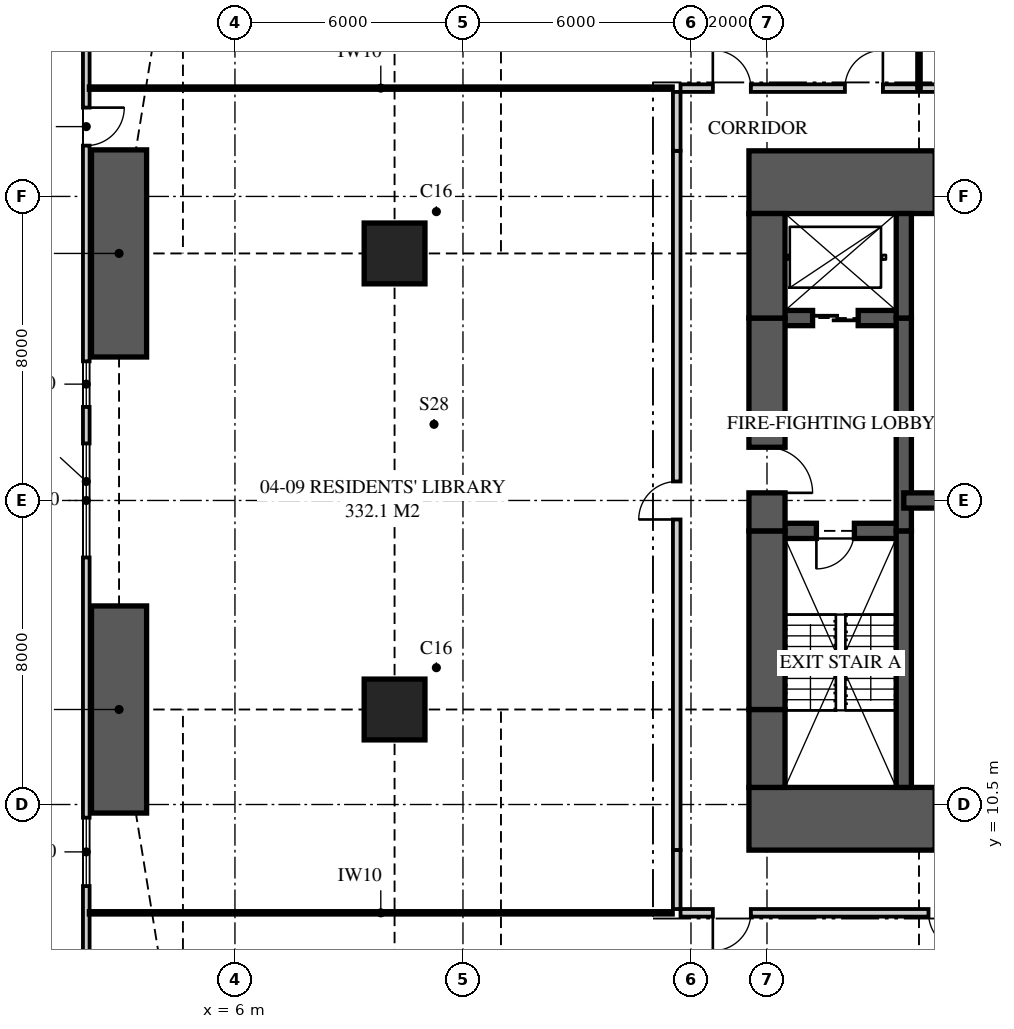
"""IFC4 building model, lengths in metres.
Left out: names, types, materials, properties, quantities, classifications, styles, units other than length and angle.
Written with IfcOpenShell. Run it as: python <this file> out.ifc"""

import sys

from ifc_helpers import new_model, si_unit, direction, frame, frame_2d, origin, origin_2d, place, context, subcontext, project, spatial, polyline, rectangle, outline, extrude, element, fill, save


model = new_model("IFC4")
c1 = context("Model", 3, precision=1e-05, world=origin(), true_north=direction((0.0, 1.0)))
c2 = subcontext(c1, "Body", "Model", "MODEL_VIEW")
j1 = project(units=[si_unit("LENGTHUNIT", "METRE"), si_unit("PLANEANGLEUNIT", "RADIAN")], contexts=[c1])
p1 = place(None, origin())
s1 = spatial("IfcSite", under=j1, at=p1, CompositionType="ELEMENT")
p2 = place(p1, origin())
s2 = spatial("IfcBuilding", under=s1, at=p2, CompositionType="ELEMENT")
p3 = place(p2, frame((0.0, 0.0, 21.0)))
s3 = spatial("IfcBuildingStorey", under=s2, at=p3, CompositionType="ELEMENT", Elevation=21.0)
for number, where, z_axis, x_axis in (
    (1, (10.2, 13.0, 0.0), (0.0, 0.0, 1.0), (1.0, 0.0, 0.0)),
    (2, (10.2, 25.0, 0.0), (0.0, 0.0, 1.0), (1.0, 0.0, 0.0)),
):
    element("IfcColumn", number, at=place(p3, frame(where, z_axis=z_axis, x_axis=x_axis)), inside=s3, PredefinedType="COLUMN", context=c2, shape_type="SweptSolid", body=[
        extrude(rectangle(XDim=1.6, YDim=1.6, at=origin_2d()), origin(), (0.0, 0.0, 1.0), 3.35),
    ])
p4 = place(p3, frame((19.525, 10.125, 0.0), z_axis=(0.0, 0.0, 1.0), x_axis=(1.0, 0.0, 0.0)))
e3 = element("IfcWall", 3, at=p4, inside=s3, PredefinedType="SHEAR", context=c2, shape_type="SweptSolid", body=[
    extrude(rectangle(XDim=6.475, YDim=1.65, at=frame_2d((3.238, 0.0))), origin(), (0.0, 0.0, 1.0), 3.35),
])
p5 = place(p4, frame((4.9, 0.0, 0.0)))
e4 = element("IfcOpeningElement", 4, at=p5, cuts=e3, PredefinedType="OPENING", context=c2, shape_type="SweptSolid", body=[
    extrude(rectangle(XDim=0.75, YDim=2.1, at=frame_2d((0.375, 1.05))), frame((0.0, 0.835, 0.0), z_axis=(0.0, -1.0, 0.0), x_axis=(1.0, 0.0, 0.0)), (0.0, 0.0, 1.0), 1.67),
])
p6 = place(p3, frame((26.0, 26.875, 0.0), z_axis=(0.0, 0.0, 1.0), x_axis=(-1.0, 0.0, 0.0)))
e5 = element("IfcWall", 5, at=p6, inside=s3, PredefinedType="SHEAR", context=c2, shape_type="SweptSolid", body=[
    extrude(rectangle(XDim=6.475, YDim=1.65, at=frame_2d((3.238, 0.0))), origin(), (0.0, 0.0, 1.0), 3.35),
])
p7 = place(p6, frame((0.825, 0.0, 0.0)))
e6 = element("IfcOpeningElement", 6, at=p7, cuts=e5, PredefinedType="OPENING", context=c2, shape_type="SweptSolid", body=[
    extrude(rectangle(XDim=0.75, YDim=2.1, at=frame_2d((0.375, 1.05))), frame((0.0, 0.835, 0.0), z_axis=(0.0, -1.0, 0.0), x_axis=(1.0, 0.0, 0.0)), (0.0, 0.0, 1.0), 1.67),
])
p8 = place(p3, frame((20.0, 26.05, 0.0), z_axis=(0.0, 0.0, 1.0), x_axis=(0.0, -1.0, 0.0)))
e7 = element("IfcWall", 7, at=p8, inside=s3, PredefinedType="SHEAR", context=c2, shape_type="SweptSolid", body=[
    extrude(rectangle(XDim=2.75, YDim=0.95, at=frame_2d((1.375, 0.0))), origin(), (0.0, 0.0, 1.0), 3.35),
])
p9 = place(p3, frame((20.0, 23.3, 0.0), z_axis=(0.0, 0.0, 1.0), x_axis=(0.0, -1.0, 0.0)))
e8 = element("IfcWall", 8, at=p9, inside=s3, PredefinedType="SHEAR", context=c2, shape_type="SweptSolid", body=[
    extrude(rectangle(XDim=5.6, YDim=0.95, at=frame_2d((2.8, 0.0))), origin(), (0.0, 0.0, 1.0), 3.35),
])
p10 = place(p9, frame((3.4, 0.0, 0.0)))
e9 = element("IfcOpeningElement", 9, at=p10, cuts=e8, PredefinedType="OPENING", context=c2, shape_type="SweptSolid", body=[
    extrude(rectangle(XDim=1.2, YDim=2.2, at=frame_2d((0.6, 1.1))), frame((0.0, 0.485, 0.0), z_axis=(0.0, -1.0, 0.0), x_axis=(1.0, 0.0, 0.0)), (0.0, 0.0, 1.0), 0.97),
])
p11 = place(p3, frame((20.0, 17.7, 0.0), z_axis=(0.0, 0.0, 1.0), x_axis=(0.0, -1.0, 0.0)))
e10 = element("IfcWall", 10, at=p11, inside=s3, PredefinedType="SHEAR", context=c2, shape_type="SweptSolid", body=[
    extrude(rectangle(XDim=4.7, YDim=0.95, at=frame_2d((2.35, 0.0))), origin(), (0.0, 0.0, 1.0), 3.35),
])
p12 = place(p3, frame((20.0, 13.0, 0.0), z_axis=(0.0, 0.0, 1.0), x_axis=(0.0, -1.0, 0.0)))
e11 = element("IfcWall", 11, at=p12, inside=s3, PredefinedType="SHEAR", context=c2, shape_type="SweptSolid", body=[
    extrude(rectangle(XDim=2.05, YDim=0.95, at=frame_2d((1.025, 0.0))), origin(), (0.0, 0.0, 1.0), 3.35),
])
p13 = place(p3, frame((23.6, 10.95, 0.0), z_axis=(0.0, 0.0, 1.0), x_axis=(0.0, 1.0, 0.0)))
e12 = element("IfcWall", 12, at=p13, inside=s3, PredefinedType="SHEAR", context=c2, shape_type="SweptSolid", body=[
    extrude(rectangle(XDim=6.75, YDim=0.4, at=frame_2d((3.375, 0.0))), origin(), (0.0, 0.0, 1.0), 3.35),
])
p14 = place(p3, frame((23.6, 17.7, 0.0), z_axis=(0.0, 0.0, 1.0), x_axis=(0.0, 1.0, 0.0)))
e13 = element("IfcWall", 13, at=p14, inside=s3, PredefinedType="SHEAR", context=c2, shape_type="SweptSolid", body=[
    extrude(rectangle(XDim=5.6, YDim=0.4, at=frame_2d((2.8, 0.0))), origin(), (0.0, 0.0, 1.0), 3.35),
])
p15 = place(p3, frame((23.6, 23.3, 0.0), z_axis=(0.0, 0.0, 1.0), x_axis=(0.0, 1.0, 0.0)))
e14 = element("IfcWall", 14, at=p15, inside=s3, PredefinedType="SHEAR", context=c2, shape_type="SweptSolid", body=[
    extrude(rectangle(XDim=2.75, YDim=0.4, at=frame_2d((1.375, 0.0))), origin(), (0.0, 0.0, 1.0), 3.35),
])
p16 = place(p3, frame((20.0, 17.7, 0.0), z_axis=(0.0, 0.0, 1.0), x_axis=(1.0, 0.0, 0.0)))
e15 = element("IfcWall", 15, at=p16, inside=s3, PredefinedType="SHEAR", context=c2, shape_type="SweptSolid", body=[
    extrude(rectangle(XDim=3.6, YDim=0.4, at=frame_2d((1.8, 0.0))), origin(), (0.0, 0.0, 1.0), 3.35),
])
p17 = place(p16, frame((1.3, 0.0, 0.0)))
e16 = element("IfcOpeningElement", 16, at=p17, cuts=e15, PredefinedType="OPENING", context=c2, shape_type="SweptSolid", body=[
    extrude(rectangle(XDim=1.0, YDim=2.1, at=frame_2d((0.5, 1.05))), frame((0.0, 0.21, 0.0), z_axis=(0.0, -1.0, 0.0), x_axis=(1.0, 0.0, 0.0)), (0.0, 0.0, 1.0), 0.42),
])
p18 = place(p3, frame((20.0, 23.3, 0.0), z_axis=(0.0, 0.0, 1.0), x_axis=(1.0, 0.0, 0.0)))
e17 = element("IfcWall", 17, at=p18, inside=s3, PredefinedType="SHEAR", context=c2, shape_type="SweptSolid", body=[
    extrude(rectangle(XDim=3.6, YDim=0.4, at=frame_2d((1.8, 0.0))), origin(), (0.0, 0.0, 1.0), 3.35),
])
p19 = place(p18, frame((1.2, 0.0, 0.0)))
e18 = element("IfcOpeningElement", 18, at=p19, cuts=e17, PredefinedType="OPENING", context=c2, shape_type="SweptSolid", body=[
    extrude(rectangle(XDim=1.2, YDim=2.1, at=frame_2d((0.6, 1.05))), frame((0.0, 0.21, 0.0), z_axis=(0.0, -1.0, 0.0), x_axis=(1.0, 0.0, 0.0)), (0.0, 0.0, 1.0), 0.42),
])
p20 = place(p3, frame((23.6, 18.5, 0.0), z_axis=(0.0, 0.0, 1.0), x_axis=(1.0, 0.0, 0.0)))
e19 = element("IfcWall", 19, at=p20, inside=s3, PredefinedType="SHEAR", context=c2, shape_type="SweptSolid", body=[
    extrude(rectangle(XDim=2.4, YDim=0.4, at=frame_2d((1.2, 0.0))), origin(), (0.0, 0.0, 1.0), 3.35),
])
p21 = place(p3, frame((2.087, 34.949, 0.0), z_axis=(0.0, 0.0, 1.0), x_axis=(0.0, -1.0, 0.0)))
e20 = element("IfcWall", 20, at=p21, inside=s3, PredefinedType="SOLIDWALL", context=c2, shape_type="SweptSolid", body=[
    extrude(outline(polyline([(0.0, 0.0), (31.897, 0.0), (31.897, 3.11), (22.167, 3.11), (22.167, 2.15), (22.074, 2.15), (22.074, 3.11), (21.949, 3.11), (21.949, 2.15), (9.949, 2.15), (9.949, 3.11), (9.823, 3.11), (9.823, 2.15), (9.73, 2.15), (9.73, 3.11), (0.0, 3.11), (0.0, 0.0)])), frame((0.0, 0.087, 0.0), z_axis=(0.0, -1.0, 0.0), x_axis=(1.0, 0.0, 0.0)), (0.0, 0.0, 1.0), 0.175),
])
p22 = place(p21, frame((1.783, 0.0, 0.0)))
e21 = element("IfcOpeningElement", 21, at=p22, cuts=e20, PredefinedType="OPENING", context=c2, shape_type="SweptSolid", body=[
    extrude(rectangle(XDim=2.7, YDim=2.1, at=frame_2d((1.35, 1.05))), frame((0.0, 0.097, 0.0), z_axis=(0.0, -1.0, 0.0), x_axis=(1.0, 0.0, 0.0)), (0.0, 0.0, 1.0), 0.195),
])
p23 = place(p21, frame((6.112, 0.0, 0.0)))
e22 = element("IfcOpeningElement", 22, at=p23, cuts=e20, PredefinedType="OPENING", context=c2, shape_type="SweptSolid", body=[
    extrude(rectangle(XDim=1.0, YDim=2.1, at=frame_2d((0.5, 1.05))), frame((0.0, 0.097, 0.0), z_axis=(0.0, -1.0, 0.0), x_axis=(1.0, 0.0, 0.0)), (0.0, 0.0, 1.0), 0.195),
])
p24 = place(p21, frame((12.788, 0.0, 0.4)))
e23 = element("IfcOpeningElement", 23, at=p24, cuts=e20, PredefinedType="OPENING", context=c2, shape_type="SweptSolid", body=[
    extrude(rectangle(XDim=1.2, YDim=1.7, at=frame_2d((0.6, 0.85))), frame((0.0, 0.097, 0.0), z_axis=(0.0, -1.0, 0.0), x_axis=(1.0, 0.0, 0.0)), (0.0, 0.0, 1.0), 0.195),
])
p25 = place(p21, frame((14.949, 0.0, 0.4)))
e24 = element("IfcOpeningElement", 24, at=p25, cuts=e20, PredefinedType="OPENING", context=c2, shape_type="SweptSolid", body=[
    extrude(rectangle(XDim=3.0, YDim=1.7, at=frame_2d((1.5, 0.85))), frame((0.0, 0.097, 0.0), z_axis=(0.0, -1.0, 0.0), x_axis=(1.0, 0.0, 0.0)), (0.0, 0.0, 1.0), 0.195),
])
p26 = place(p21, frame((24.795, 0.0, 0.4)))
e25 = element("IfcOpeningElement", 25, at=p26, cuts=e20, PredefinedType="OPENING", context=c2, shape_type="SweptSolid", body=[
    extrude(rectangle(XDim=1.8, YDim=1.7, at=frame_2d((0.9, 0.85))), frame((0.0, 0.097, 0.0), z_axis=(0.0, -1.0, 0.0), x_axis=(1.0, 0.0, 0.0)), (0.0, 0.0, 1.0), 0.195),
])
p27 = place(p21, frame((29.123, 0.0, 0.0)))
e26 = element("IfcOpeningElement", 26, at=p27, cuts=e20, PredefinedType="OPENING", context=c2, shape_type="SweptSolid", body=[
    extrude(rectangle(XDim=1.0, YDim=2.1, at=frame_2d((0.5, 1.05))), frame((0.0, 0.097, 0.0), z_axis=(0.0, -1.0, 0.0), x_axis=(1.0, 0.0, 0.0)), (0.0, 0.0, 1.0), 0.195),
])
p28 = place(p3, frame((17.725, 7.65, 0.0), z_axis=(0.0, 0.0, 1.0), x_axis=(1.0, 0.0, 0.0)))
e27 = element("IfcWall", 27, at=p28, inside=s3, PredefinedType="PARTITIONING", context=c2, shape_type="SweptSolid", body=[
    extrude(outline(polyline([(0.0, 0.0), (8.425, 0.0), (8.425, 3.11), (6.612, 3.11), (6.612, 2.541), (5.938, 2.541), (5.938, 3.11), (0.0, 3.11), (0.0, 0.0)])), frame((0.0, 0.1, 0.0), z_axis=(0.0, -1.0, 0.0), x_axis=(1.0, 0.0, 0.0)), (0.0, 0.0, 1.0), 0.2),
])
p29 = place(p28, frame((0.85, 0.0, 0.0)))
e28 = element("IfcOpeningElement", 28, at=p29, cuts=e27, PredefinedType="OPENING", context=c2, shape_type="SweptSolid", body=[
    extrude(rectangle(XDim=1.0, YDim=2.1, at=frame_2d((0.5, 1.05))), frame((0.0, 0.11, 0.0), z_axis=(0.0, -1.0, 0.0), x_axis=(1.0, 0.0, 0.0)), (0.0, 0.0, 1.0), 0.22),
])
p30 = place(p28, frame((6.525, 0.0, 0.0)))
e29 = element("IfcOpeningElement", 29, at=p30, cuts=e27, PredefinedType="OPENING", context=c2, shape_type="SweptSolid", body=[
    extrude(rectangle(XDim=1.0, YDim=2.1, at=frame_2d((0.5, 1.05))), frame((0.0, 0.11, 0.0), z_axis=(0.0, -1.0, 0.0), x_axis=(1.0, 0.0, 0.0)), (0.0, 0.0, 1.0), 0.22),
])
p31 = place(p3, frame((17.625, 7.75, 0.0), z_axis=(0.0, 0.0, 1.0), x_axis=(0.0, 1.0, 0.0)))
e30 = element("IfcWall", 30, at=p31, inside=s3, PredefinedType="PARTITIONING", context=c2, shape_type="SweptSolid", body=[
    extrude(rectangle(XDim=1.55, YDim=0.2, at=frame_2d((0.775, 0.0))), origin(), (0.0, 0.0, 1.0), 3.11),
])
p32 = place(p3, frame((17.725, 29.35, 0.0), z_axis=(0.0, 0.0, 1.0), x_axis=(1.0, 0.0, 0.0)))
e31 = element("IfcWall", 31, at=p32, inside=s3, PredefinedType="PARTITIONING", context=c2, shape_type="SweptSolid", body=[
    extrude(outline(polyline([(0.0, 0.0), (6.225, 0.0), (6.225, 3.11), (6.225, 2.541), (5.938, 2.541), (5.938, 3.11), (0.0, 3.11), (0.0, 0.0)])), frame((0.0, 0.1, 0.0), z_axis=(0.0, -1.0, 0.0), x_axis=(1.0, 0.0, 0.0)), (0.0, 0.0, 1.0), 0.2),
])
p33 = place(p32, frame((0.85, 0.0, 0.0)))
e32 = element("IfcOpeningElement", 32, at=p33, cuts=e31, PredefinedType="OPENING", context=c2, shape_type="SweptSolid", body=[
    extrude(rectangle(XDim=1.0, YDim=2.1, at=frame_2d((0.5, 1.05))), frame((0.0, 0.11, 0.0), z_axis=(0.0, -1.0, 0.0), x_axis=(1.0, 0.0, 0.0)), (0.0, 0.0, 1.0), 0.22),
])
p34 = place(p32, frame((4.325, 0.0, 0.0)))
e33 = element("IfcOpeningElement", 33, at=p34, cuts=e31, PredefinedType="OPENING", context=c2, shape_type="SweptSolid", body=[
    extrude(rectangle(XDim=1.0, YDim=2.1, at=frame_2d((0.5, 1.05))), frame((0.0, 0.11, 0.0), z_axis=(0.0, -1.0, 0.0), x_axis=(1.0, 0.0, 0.0)), (0.0, 0.0, 1.0), 0.22),
])
p35 = place(p3, frame((24.05, 29.35, 0.0), z_axis=(0.0, 0.0, 1.0), x_axis=(1.0, 0.0, 0.0)))
e34 = element("IfcWall", 34, at=p35, inside=s3, PredefinedType="PARTITIONING", context=c2, shape_type="SweptSolid", body=[
    extrude(outline(polyline([(0.0, 0.0), (13.075, 0.0), (13.075, 3.11), (11.287, 3.11), (11.287, 2.541), (10.613, 2.541), (10.613, 3.11), (0.287, 3.11), (0.287, 2.541), (0.0, 2.541), (0.0, 3.11), (0.0, 0.0)])), frame((0.0, 0.1, 0.0), z_axis=(0.0, -1.0, 0.0), x_axis=(1.0, 0.0, 0.0)), (0.0, 0.0, 1.0), 0.2),
])
p36 = place(p35, frame((0.9, 0.0, 0.0)))
e35 = element("IfcOpeningElement", 35, at=p36, cuts=e34, PredefinedType="OPENING", context=c2, shape_type="SweptSolid", body=[
    extrude(rectangle(XDim=1.0, YDim=2.1, at=frame_2d((0.5, 1.05))), frame((0.0, 0.11, 0.0), z_axis=(0.0, -1.0, 0.0), x_axis=(1.0, 0.0, 0.0)), (0.0, 0.0, 1.0), 0.22),
])
p37 = place(p35, frame((11.2, 0.0, 0.0)))
e36 = element("IfcOpeningElement", 36, at=p37, cuts=e34, PredefinedType="OPENING", context=c2, shape_type="SweptSolid", body=[
    extrude(rectangle(XDim=1.0, YDim=2.1, at=frame_2d((0.5, 1.05))), frame((0.0, 0.11, 0.0), z_axis=(0.0, -1.0, 0.0), x_axis=(1.0, 0.0, 0.0)), (0.0, 0.0, 1.0), 0.22),
])
p38 = place(p3, frame((17.625, 27.7, 0.0), z_axis=(0.0, 0.0, 1.0), x_axis=(0.0, 1.0, 0.0)))
e37 = element("IfcWall", 37, at=p38, inside=s3, PredefinedType="PARTITIONING", context=c2, shape_type="SweptSolid", body=[
    extrude(rectangle(XDim=1.55, YDim=0.2, at=frame_2d((0.775, 0.0))), origin(), (0.0, 0.0, 1.0), 3.11),
])
p39 = place(p3, frame((17.625, 9.3, 0.0), z_axis=(0.0, 0.0, 1.0), x_axis=(0.0, 1.0, 0.0)))
e38 = element("IfcWall", 38, at=p39, inside=s3, PredefinedType="PARTITIONING", context=c2, shape_type="SweptSolid", body=[
    extrude(outline(polyline([(0.0, 0.0), (18.4, 0.0), (18.4, 3.11), (16.037, 3.11), (16.037, 2.541), (15.363, 2.541), (15.363, 3.11), (4.037, 3.11), (4.037, 2.541), (3.363, 2.541), (3.363, 3.11), (0.0, 3.11), (0.0, 0.0)])), frame((0.0, 0.1, 0.0), z_axis=(0.0, -1.0, 0.0), x_axis=(1.0, 0.0, 0.0)), (0.0, 0.0, 1.0), 0.2),
])
p40 = place(p39, frame((8.7, 0.0, 0.0)))
e39 = element("IfcOpeningElement", 39, at=p40, cuts=e38, PredefinedType="OPENING", context=c2, shape_type="SweptSolid", body=[
    extrude(rectangle(XDim=1.0, YDim=2.1, at=frame_2d((0.5, 1.05))), frame((0.0, 0.11, 0.0), z_axis=(0.0, -1.0, 0.0), x_axis=(1.0, 0.0, 0.0)), (0.0, 0.0, 1.0), 0.22),
])
p41 = place(p3, frame((2.15, 7.65, 0.0), z_axis=(0.0, 0.0, 1.0), x_axis=(1.0, 0.0, 0.0)))
e40 = element("IfcWall", 40, at=p41, inside=s3, PredefinedType="PARTITIONING", context=c2, shape_type="SweptSolid", body=[
    extrude(outline(polyline([(0.0, 0.0), (15.375, 0.0), (15.375, 3.11), (11.137, 3.11), (11.137, 2.541), (10.562, 2.541), (10.562, 3.11), (9.31, 3.11), (9.31, 2.51), (6.79, 2.51), (6.79, 3.11), (2.769, 3.11), (2.769, 2.541), (2.539, 2.541), (2.539, 2.15), (0.796, 2.15), (0.796, 3.11), (0.0, 3.11), (0.0, 0.0)])), frame((0.0, 0.05, 0.0), z_axis=(0.0, -1.0, 0.0), x_axis=(1.0, 0.0, 0.0)), (0.0, 0.0, 1.0), 0.1),
])
p42 = place(p3, frame((24.0, 29.45, 0.0), z_axis=(0.0, 0.0, 1.0), x_axis=(0.0, 1.0, 0.0)))
e41 = element("IfcWall", 41, at=p42, inside=s3, PredefinedType="PARTITIONING", context=c2, shape_type="SweptSolid", body=[
    extrude(outline(polyline([(0.0, 0.0), (8.4, 0.0), (8.4, 2.15), (6.8, 2.15), (6.8, 2.541), (0.0, 2.541), (0.0, 0.0)])), frame((0.0, 0.05, 0.0), z_axis=(0.0, -1.0, 0.0), x_axis=(1.0, 0.0, 0.0)), (0.0, 0.0, 1.0), 0.1),
])
p43 = place(p3, frame((2.15, 29.35, 0.0), z_axis=(0.0, 0.0, 1.0), x_axis=(1.0, 0.0, 0.0)))
e42 = element("IfcWall", 42, at=p43, inside=s3, PredefinedType="PARTITIONING", context=c2, shape_type="SweptSolid", body=[
    extrude(outline(polyline([(0.0, 0.0), (15.375, 0.0), (15.375, 3.11), (11.137, 3.11), (11.137, 2.541), (10.562, 2.541), (10.562, 3.11), (9.31, 3.11), (9.31, 2.51), (6.79, 2.51), (6.79, 3.11), (2.769, 3.11), (2.769, 2.541), (2.377, 2.541), (2.377, 2.15), (0.634, 2.15), (0.634, 3.11), (0.0, 3.11), (0.0, 0.0)])), frame((0.0, 0.05, 0.0), z_axis=(0.0, -1.0, 0.0), x_axis=(1.0, 0.0, 0.0)), (0.0, 0.0, 1.0), 0.1),
])
for number, where, z_axis, x_axis in (
    (43, (2.95, 22.275, 0.0), (0.0, 0.0, 1.0), (0.0, 1.0, 0.0)),
    (44, (2.95, 10.275, 0.0), (0.0, 0.0, 1.0), (0.0, 1.0, 0.0)),
):
    element("IfcWall", number, at=place(p3, frame(where, z_axis=z_axis, x_axis=x_axis)), inside=s3, PredefinedType="SHEAR", context=c2, shape_type="SweptSolid", body=[
        extrude(rectangle(XDim=5.45, YDim=1.45, at=frame_2d((2.725, 0.0))), origin(), (0.0, 0.0, 1.0), 3.35),
    ])
p44 = place(p23, origin())
e45 = element("IfcDoor", 45, at=p44, inside=s3, OperationType="SINGLE_SWING_LEFT", PredefinedType="DOOR", context=c2, shape_type="SweptSolid", body=[
    extrude(rectangle(XDim=1.0, YDim=2.1, at=frame_2d((0.5, 1.05))), frame((0.0, 0.025, 0.0), z_axis=(0.0, -1.0, 0.0), x_axis=(1.0, 0.0, 0.0)), (0.0, 0.0, 1.0), 0.05),
])
fill(e22, e45)
p45 = place(p24, origin())
e46 = element("IfcWindow", 46, at=p45, inside=s3, PartitioningType="SINGLE_PANEL", PredefinedType="WINDOW", context=c2, shape_type="SweptSolid", body=[
    extrude(rectangle(XDim=1.2, YDim=1.7, at=frame_2d((0.6, 0.85))), frame((0.0, 0.03, 0.0), z_axis=(0.0, -1.0, 0.0), x_axis=(1.0, 0.0, 0.0)), (0.0, 0.0, 1.0), 0.06),
])
fill(e23, e46)
p46 = place(p25, origin())
e47 = element("IfcWindow", 47, at=p46, inside=s3, PartitioningType="SINGLE_PANEL", PredefinedType="WINDOW", context=c2, shape_type="SweptSolid", body=[
    extrude(rectangle(XDim=3.0, YDim=1.7, at=frame_2d((1.5, 0.85))), frame((0.0, 0.03, 0.0), z_axis=(0.0, -1.0, 0.0), x_axis=(1.0, 0.0, 0.0)), (0.0, 0.0, 1.0), 0.06),
])
fill(e24, e47)
p47 = place(p26, origin())
e48 = element("IfcWindow", 48, at=p47, inside=s3, PartitioningType="SINGLE_PANEL", PredefinedType="WINDOW", context=c2, shape_type="SweptSolid", body=[
    extrude(rectangle(XDim=1.8, YDim=1.7, at=frame_2d((0.9, 0.85))), frame((0.0, 0.03, 0.0), z_axis=(0.0, -1.0, 0.0), x_axis=(1.0, 0.0, 0.0)), (0.0, 0.0, 1.0), 0.06),
])
fill(e25, e48)
p48 = place(p29, frame((1.0, 0.0, 0.0), z_axis=(0.0, 0.0, 1.0), x_axis=(-1.0, 0.0, 0.0)))
e49 = element("IfcDoor", 49, at=p48, inside=s3, OperationType="SINGLE_SWING_RIGHT", PredefinedType="DOOR", context=c2, shape_type="SweptSolid", body=[
    extrude(rectangle(XDim=1.0, YDim=2.1, at=frame_2d((0.5, 1.05))), frame((0.0, 0.025, 0.0), z_axis=(0.0, -1.0, 0.0), x_axis=(1.0, 0.0, 0.0)), (0.0, 0.0, 1.0), 0.05),
])
fill(e28, e49)
p49 = place(p30, frame((1.0, 0.0, 0.0), z_axis=(0.0, 0.0, 1.0), x_axis=(-1.0, 0.0, 0.0)))
e50 = element("IfcDoor", 50, at=p49, inside=s3, OperationType="SINGLE_SWING_LEFT", PredefinedType="DOOR", context=c2, shape_type="SweptSolid", body=[
    extrude(rectangle(XDim=1.0, YDim=2.1, at=frame_2d((0.5, 1.05))), frame((0.0, 0.025, 0.0), z_axis=(0.0, -1.0, 0.0), x_axis=(1.0, 0.0, 0.0)), (0.0, 0.0, 1.0), 0.05),
])
fill(e29, e50)
p50 = place(p33, origin())
e51 = element("IfcDoor", 51, at=p50, inside=s3, OperationType="SINGLE_SWING_LEFT", PredefinedType="DOOR", context=c2, shape_type="SweptSolid", body=[
    extrude(rectangle(XDim=1.0, YDim=2.1, at=frame_2d((0.5, 1.05))), frame((0.0, 0.025, 0.0), z_axis=(0.0, -1.0, 0.0), x_axis=(1.0, 0.0, 0.0)), (0.0, 0.0, 1.0), 0.05),
])
fill(e32, e51)
p51 = place(p34, origin())
e52 = element("IfcDoor", 52, at=p51, inside=s3, OperationType="SINGLE_SWING_RIGHT", PredefinedType="DOOR", context=c2, shape_type="SweptSolid", body=[
    extrude(rectangle(XDim=1.0, YDim=2.1, at=frame_2d((0.5, 1.05))), frame((0.0, 0.025, 0.0), z_axis=(0.0, -1.0, 0.0), x_axis=(1.0, 0.0, 0.0)), (0.0, 0.0, 1.0), 0.05),
])
fill(e33, e52)
p52 = place(p40, origin())
e53 = element("IfcDoor", 53, at=p52, inside=s3, OperationType="SINGLE_SWING_LEFT", PredefinedType="DOOR", context=c2, shape_type="SweptSolid", body=[
    extrude(rectangle(XDim=1.0, YDim=2.1, at=frame_2d((0.5, 1.05))), frame((0.0, 0.025, 0.0), z_axis=(0.0, -1.0, 0.0), x_axis=(1.0, 0.0, 0.0)), (0.0, 0.0, 1.0), 0.05),
])
fill(e39, e53)
p53 = place(p17, frame((1.0, 0.0, 0.0), z_axis=(0.0, 0.0, 1.0), x_axis=(-1.0, 0.0, 0.0)))
e54 = element("IfcDoor", 54, at=p53, inside=s3, OperationType="SINGLE_SWING_RIGHT", PredefinedType="DOOR", context=c2, shape_type="SweptSolid", body=[
    extrude(rectangle(XDim=1.0, YDim=2.1, at=frame_2d((0.5, 1.05))), frame((0.0, 0.025, 0.0), z_axis=(0.0, -1.0, 0.0), x_axis=(1.0, 0.0, 0.0)), (0.0, 0.0, 1.0), 0.05),
])
fill(e16, e54)
p54 = place(p10, origin())
e55 = element("IfcDoor", 55, at=p54, inside=s3, OperationType="SINGLE_SWING_RIGHT", PredefinedType="DOOR", context=c2, shape_type="SweptSolid", body=[
    extrude(rectangle(XDim=1.2, YDim=2.2, at=frame_2d((0.6, 1.1))), frame((0.0, 0.025, 0.0), z_axis=(0.0, -1.0, 0.0), x_axis=(1.0, 0.0, 0.0)), (0.0, 0.0, 1.0), 0.05),
])
fill(e9, e55)
p55 = place(p19, origin())
e56 = element("IfcDoor", 56, at=p55, inside=s3, OperationType="SLIDING_TO_LEFT", PredefinedType="DOOR", context=c2, shape_type="SweptSolid", body=[
    extrude(rectangle(XDim=1.2, YDim=2.1, at=frame_2d((0.6, 1.05))), frame((0.0, 0.025, 0.0), z_axis=(0.0, -1.0, 0.0), x_axis=(1.0, 0.0, 0.0)), (0.0, 0.0, 1.0), 0.05),
])
fill(e18, e56)
save(model, sys.argv[1])
